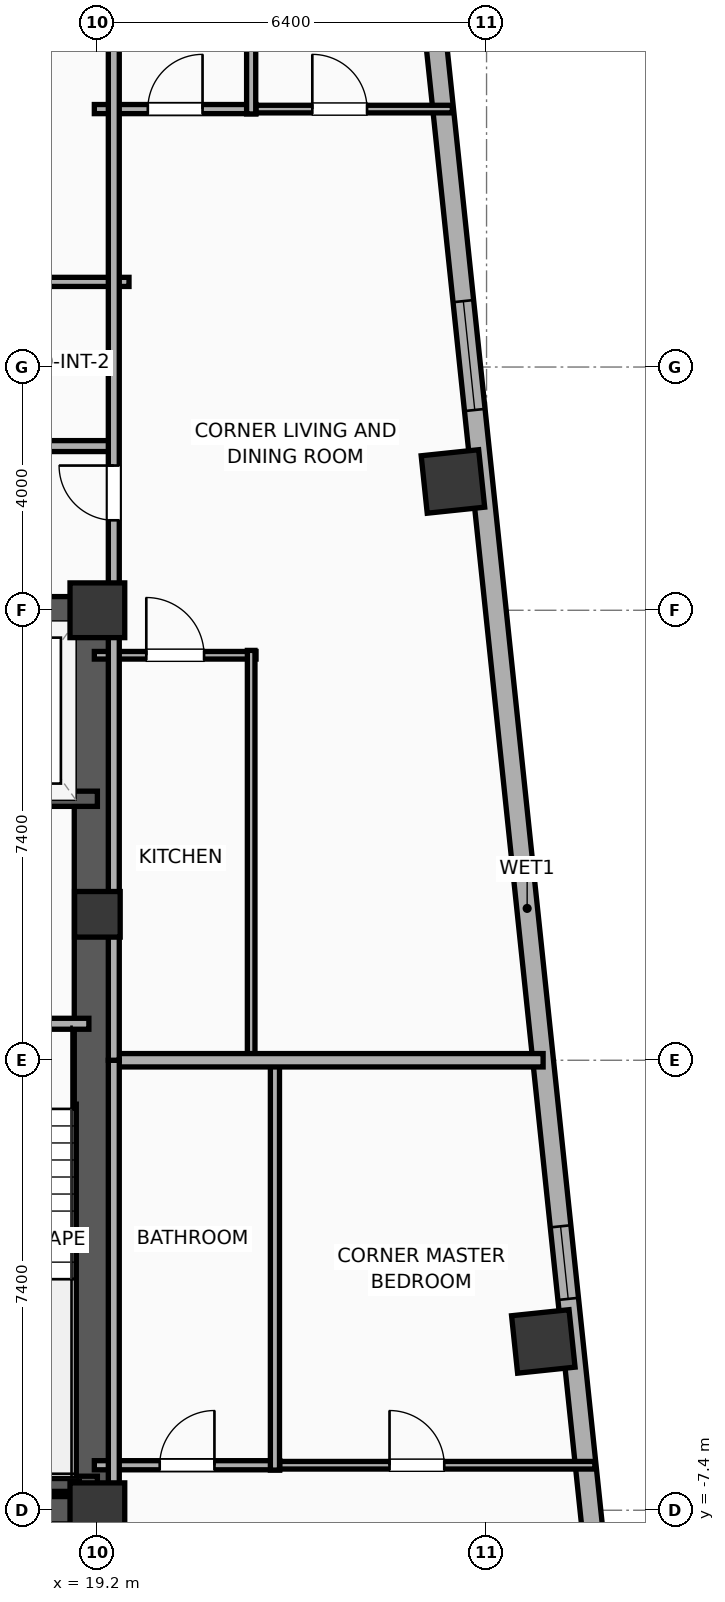
"""IFC4 building model, lengths in metres.
Left out: names, types, materials, properties, quantities, classifications, styles, units other than length and angle.
Written with IfcOpenShell. Run it as: python <this file> out.ifc"""

import sys

from ifc_helpers import new_model, si_unit, direction, frame, frame_2d, origin, origin_2d, place, context, subcontext, project, spatial, rectangle, hollow_rectangle, extrude, element, fill, save


model = new_model("IFC4")
c1 = context("Model", 3, precision=1e-05, world=origin(), true_north=direction((0.0, 1.0)))
c2 = subcontext(c1, "Body", "Model", "MODEL_VIEW")
j1 = project(units=[si_unit("LENGTHUNIT", "METRE"), si_unit("PLANEANGLEUNIT", "RADIAN")], contexts=[c1])
p1 = place(None, origin())
s1 = spatial("IfcSite", under=j1, at=p1, CompositionType="ELEMENT")
p2 = place(p1, origin())
s2 = spatial("IfcBuilding", under=s1, at=p2, CompositionType="ELEMENT")
p3 = place(p2, frame((0.0, 0.0, 179.4)))
s3 = spatial("IfcBuildingStorey", under=s2, at=p3, CompositionType="ELEMENT", Elevation=179.4)
p4 = place(p3, frame((19.2, -7.4, 0.0), z_axis=(0.0, 0.0, 1.0), x_axis=(1.0, 0.0, 0.0)))
e1 = element("IfcColumn", 1, at=p4, inside=s3, PredefinedType="COLUMN", context=c2, shape_type="SweptSolid", body=[
    extrude(rectangle(XDim=0.9, YDim=0.9, at=origin_2d()), origin(), (0.0, 0.0, 1.0), 3.9),
])
p5 = place(p3, frame((19.2, 2.4, 0.0), z_axis=(0.0, 0.0, 1.0), x_axis=(1.0, 0.0, 0.0)))
e2 = element("IfcColumn", 2, at=p5, inside=s3, PredefinedType="COLUMN", context=c2, shape_type="SweptSolid", body=[
    extrude(rectangle(XDim=0.75, YDim=0.75, at=origin_2d()), origin(), (0.0, 0.0, 1.0), 3.9),
])
p6 = place(p3, frame((19.2, 7.4, 0.0), z_axis=(0.0, 0.0, 1.0), x_axis=(1.0, 0.0, 0.0)))
e3 = element("IfcColumn", 3, at=p6, inside=s3, PredefinedType="COLUMN", context=c2, shape_type="SweptSolid", body=[
    extrude(rectangle(XDim=0.9, YDim=0.9, at=origin_2d()), origin(), (0.0, 0.0, 1.0), 3.9),
])
for number, where, z_axis, x_axis in (
    (4, (12.175, -7.4, 0.0), (0.0, 0.0, 1.0), (1.0, 0.0, 0.0)),
    (5, (12.175, 7.4, 0.0), (0.0, 0.0, 1.0), (1.0, 0.0, 0.0)),
):
    element("IfcWall", number, at=place(p3, frame(where, z_axis=z_axis, x_axis=x_axis)), inside=s3, PredefinedType="SHEAR", context=c2, shape_type="SweptSolid", body=[
        extrude(rectangle(XDim=7.25, YDim=0.45, at=frame_2d((3.625, 0.0))), origin(), (0.0, 0.0, 1.0), 3.65),
    ])
p7 = place(p3, frame((19.145, -7.4, 0.0), z_axis=(0.0, 0.0, 1.0), x_axis=(0.0, 1.0, 0.0)))
e6 = element("IfcWall", 6, at=p7, inside=s3, PredefinedType="SHEAR", context=c2, shape_type="SweptSolid", body=[
    extrude(rectangle(XDim=14.8, YDim=0.65, at=frame_2d((7.4, 0.0))), origin(), (0.0, 0.0, 1.0), 3.65),
])
p8 = place(p3, frame((15.74, -6.965, 0.0), z_axis=(0.0, 0.0, 1.0), x_axis=(1.0, 0.0, 0.0)))
e7 = element("IfcWall", 7, at=p8, inside=s3, PredefinedType="SOLIDWALL", context=c2, shape_type="SweptSolid", body=[
    extrude(rectangle(XDim=3.46, YDim=0.25, at=frame_2d((1.73, 0.0))), origin(), (0.0, 0.0, 1.0), 3.65),
])
for number, where, z_axis, x_axis in (
    (8, (26.533, -4.624, 0.0), (0.0, 0.0, 1.0), (0.995, 0.105, 0.0)),
    (9, (25.047, 9.518, 0.0), (0.0, 0.0, 1.0), (0.995, 0.105, 0.0)),
):
    element("IfcColumn", number, at=place(p3, frame(where, z_axis=z_axis, x_axis=x_axis)), inside=s3, PredefinedType="COLUMN", context=c2, shape_type="SweptSolid", body=[
        extrude(hollow_rectangle(XDim=0.95, YDim=0.95, WallThickness=0.032, at=origin_2d()), origin(), (0.0, 0.0, 1.0), 3.9),
    ])
p9 = place(p3, frame((24.534, 18.99, 0.0), z_axis=(0.0, 0.0, 1.0), x_axis=(0.104534959766, -0.994521212537, 0.0)))
e10 = element("IfcWall", 10, at=p9, inside=s3, PredefinedType="ELEMENTEDWALL", context=c2, shape_type="SweptSolid", body=[
    extrude(rectangle(XDim=33.166, YDim=0.34, at=frame_2d((16.583, 0.0))), origin(), (0.0, 0.0, 1.0), 3.65),
])
p10 = place(p9, frame((6.542, 0.0, 0.75)))
e11 = element("IfcOpeningElement", 11, at=p10, cuts=e10, PredefinedType="OPENING", context=c2, shape_type="SweptSolid", body=[
    extrude(rectangle(XDim=1.8, YDim=2.1, at=frame_2d((0.9, 1.05))), frame((0.0, 0.18, 0.0), z_axis=(0.0, -1.0, 0.0), x_axis=(1.0, 0.0, 0.0)), (0.0, 0.0, 1.0), 0.36),
])
p11 = place(p9, frame((21.84, 0.0, 0.75)))
e12 = element("IfcOpeningElement", 12, at=p11, cuts=e10, PredefinedType="OPENING", context=c2, shape_type="SweptSolid", body=[
    extrude(rectangle(XDim=1.2, YDim=2.05, at=frame_2d((0.6, 1.025))), frame((0.0, 0.18, 0.0), z_axis=(0.0, -1.0, 0.0), x_axis=(1.0, 0.0, 0.0)), (0.0, 0.0, 1.0), 0.36),
])
p12 = place(p3, frame((16.6, 4.3, 0.0), z_axis=(0.0, 0.0, 1.0), x_axis=(1.0, 0.0, 0.0)))
e13 = element("IfcWall", 13, at=p12, inside=s3, PredefinedType="SOLIDWALL", context=c2, shape_type="SweptSolid", body=[
    extrude(rectangle(XDim=2.6, YDim=0.25, at=frame_2d((1.3, 0.0))), origin(), (0.0, 0.0, 1.0), 3.65),
])
p13 = place(p3, frame((15.7, 0.6, 0.0), z_axis=(0.0, 0.0, 1.0), x_axis=(1.0, 0.0, 0.0)))
e14 = element("IfcWall", 14, at=p13, inside=s3, PredefinedType="PARTITIONING", context=c2, shape_type="SweptSolid", body=[
    extrude(rectangle(XDim=3.36, YDim=0.18, at=frame_2d((1.68, 0.0))), origin(), (0.0, 0.0, 1.0), 3.65),
])
p14 = place(p13, frame((1.155, 0.0, 0.0)))
e15 = element("IfcOpeningElement", 15, at=p14, cuts=e14, PredefinedType="OPENING", context=c2, shape_type="SweptSolid", body=[
    extrude(rectangle(XDim=1.05, YDim=2.05, at=frame_2d((0.525, 1.025))), frame((0.0, 0.1, 0.0), z_axis=(0.0, -1.0, 0.0), x_axis=(1.0, 0.0, 0.0)), (0.0, 0.0, 1.0), 0.2),
])
p15 = place(p3, frame((17.136, 12.8, 0.0), z_axis=(0.0, 0.0, 1.0), x_axis=(1.0, 0.0, 0.0)))
e16 = element("IfcWall", 16, at=p15, inside=s3, PredefinedType="PLUMBINGWALL", context=c2, shape_type="SweptSolid", body=[
    extrude(rectangle(XDim=2.584, YDim=0.15, at=frame_2d((1.292, 0.0))), origin(), (0.0, 0.0, 1.0), 3.65),
])
p16 = place(p3, frame((8.08, 10.1, 0.0), z_axis=(0.0, 0.0, 1.0), x_axis=(1.0, 0.0, 0.0)))
e17 = element("IfcWall", 17, at=p16, inside=s3, PredefinedType="PARTITIONING", context=c2, shape_type="SweptSolid", body=[
    extrude(rectangle(XDim=11.42, YDim=0.18, at=frame_2d((5.71, 0.0))), origin(), (0.0, 0.0, 1.0), 3.65),
])
p17 = place(p16, frame((2.562, 0.0, 0.0)))
e18 = element("IfcOpeningElement", 18, at=p17, cuts=e17, PredefinedType="OPENING", context=c2, shape_type="SweptSolid", body=[
    extrude(rectangle(XDim=0.9, YDim=2.05, at=frame_2d((0.45, 1.025))), frame((0.0, 0.1, 0.0), z_axis=(0.0, -1.0, 0.0), x_axis=(1.0, 0.0, 0.0)), (0.0, 0.0, 1.0), 0.2),
])
p18 = place(p16, frame((6.853, 0.0, 0.0)))
e19 = element("IfcOpeningElement", 19, at=p18, cuts=e17, PredefinedType="OPENING", context=c2, shape_type="SweptSolid", body=[
    extrude(rectangle(XDim=1.15, YDim=2.05, at=frame_2d((0.575, 1.025))), frame((0.0, 0.1, 0.0), z_axis=(0.0, -1.0, 0.0), x_axis=(1.0, 0.0, 0.0)), (0.0, 0.0, 1.0), 0.2),
])
p19 = place(p3, frame((22.06, -6.66, 0.0), z_axis=(0.0, 0.0, 1.0), x_axis=(1.0, 0.0, 0.0)))
e20 = element("IfcWall", 20, at=p19, inside=s3, PredefinedType="PARTITIONING", context=c2, shape_type="SweptSolid", body=[
    extrude(rectangle(XDim=5.321, YDim=0.125, at=frame_2d((2.661, 0.0))), origin(), (0.0, 0.0, 1.0), 3.65),
])
p20 = place(p19, frame((1.945, 0.0, 0.0)))
e21 = element("IfcOpeningElement", 21, at=p20, cuts=e20, PredefinedType="OPENING", context=c2, shape_type="SweptSolid", body=[
    extrude(rectangle(XDim=0.9, YDim=2.05, at=frame_2d((0.45, 1.025))), frame((0.0, 0.073, 0.0), z_axis=(0.0, -1.0, 0.0), x_axis=(1.0, 0.0, 0.0)), (0.0, 0.0, 1.0), 0.145),
])
p21 = place(p3, frame((19.15, -6.66, 0.0), z_axis=(0.0, 0.0, 1.0), x_axis=(1.0, 0.0, 0.0)))
e22 = element("IfcWall", 22, at=p21, inside=s3, PredefinedType="PLUMBINGWALL", context=c2, shape_type="SweptSolid", body=[
    extrude(rectangle(XDim=3.05, YDim=0.15, at=frame_2d((1.525, 0.0))), origin(), (0.0, 0.0, 1.0), 3.04),
])
p22 = place(p21, frame((1.075, 0.0, 0.0)))
e23 = element("IfcOpeningElement", 23, at=p22, cuts=e22, PredefinedType="OPENING", context=c2, shape_type="SweptSolid", body=[
    extrude(rectangle(XDim=0.9, YDim=2.05, at=frame_2d((0.45, 1.025))), frame((0.0, 0.085, 0.0), z_axis=(0.0, -1.0, 0.0), x_axis=(1.0, 0.0, 0.0)), (0.0, 0.0, 1.0), 0.17),
])
p23 = place(p3, frame((22.12, -6.74, 0.0), z_axis=(0.0, 0.0, 1.0), x_axis=(0.0, 1.0, 0.0)))
e24 = element("IfcWall", 24, at=p23, inside=s3, PredefinedType="PLUMBINGWALL", context=c2, shape_type="SweptSolid", body=[
    extrude(rectangle(XDim=6.72, YDim=0.15, at=frame_2d((3.36, 0.0))), origin(), (0.0, 0.0, 1.0), 3.65),
])
p24 = place(p3, frame((21.669, 15.642, 0.0), z_axis=(0.0, 0.0, 1.0), x_axis=(1.0, 0.0, 0.0)))
e25 = element("IfcWall", 25, at=p24, inside=s3, PredefinedType="PARTITIONING", context=c2, shape_type="SweptSolid", body=[
    extrude(rectangle(XDim=3.368, YDim=0.125, at=frame_2d((1.684, 0.0))), origin(), (0.0, 0.0, 1.0), 3.65),
])
p25 = place(p24, frame((1.066, 0.0, 0.0)))
e26 = element("IfcOpeningElement", 26, at=p25, cuts=e25, PredefinedType="OPENING", context=c2, shape_type="SweptSolid", body=[
    extrude(rectangle(XDim=0.9, YDim=2.05, at=frame_2d((0.45, 1.025))), frame((0.0, 0.073, 0.0), z_axis=(0.0, -1.0, 0.0), x_axis=(1.0, 0.0, 0.0)), (0.0, 0.0, 1.0), 0.145),
])
p26 = place(p3, frame((19.15, 6.66, 0.0), z_axis=(0.0, 0.0, 1.0), x_axis=(1.0, 0.0, 0.0)))
e27 = element("IfcWall", 27, at=p26, inside=s3, PredefinedType="PARTITIONING", context=c2, shape_type="SweptSolid", body=[
    extrude(rectangle(XDim=2.659, YDim=0.125, at=frame_2d((1.33, 0.0))), origin(), (0.0, 0.0, 1.0), 3.65),
])
p27 = place(p26, frame((0.854, 0.0, 0.0)))
e28 = element("IfcOpeningElement", 28, at=p27, cuts=e27, PredefinedType="OPENING", context=c2, shape_type="SweptSolid", body=[
    extrude(rectangle(XDim=0.95, YDim=2.05, at=frame_2d((0.475, 1.025))), frame((0.0, 0.073, 0.0), z_axis=(0.0, -1.0, 0.0), x_axis=(1.0, 0.0, 0.0)), (0.0, 0.0, 1.0), 0.145),
])
p28 = place(p3, frame((19.15, 15.642, 0.0), z_axis=(0.0, 0.0, 1.0), x_axis=(1.0, 0.0, 0.0)))
e29 = element("IfcWall", 29, at=p28, inside=s3, PredefinedType="PLUMBINGWALL", context=c2, shape_type="SweptSolid", body=[
    extrude(rectangle(XDim=2.659, YDim=0.15, at=frame_2d((1.33, 0.0))), origin(), (0.0, 0.0, 1.0), 3.65),
])
p29 = place(p28, frame((0.879, 0.0, 0.0)))
e30 = element("IfcOpeningElement", 30, at=p29, cuts=e29, PredefinedType="OPENING", context=c2, shape_type="SweptSolid", body=[
    extrude(rectangle(XDim=0.9, YDim=2.05, at=frame_2d((0.45, 1.025))), frame((0.0, 0.085, 0.0), z_axis=(0.0, -1.0, 0.0), x_axis=(1.0, 0.0, 0.0)), (0.0, 0.0, 1.0), 0.17),
])
p30 = place(p3, frame((21.729, 0.02, 0.0), z_axis=(0.0, 0.0, 1.0), x_axis=(0.0, 1.0, 0.0)))
e31 = element("IfcWall", 31, at=p30, inside=s3, PredefinedType="PARTITIONING", context=c2, shape_type="SweptSolid", body=[
    extrude(rectangle(XDim=6.72, YDim=0.125, at=frame_2d((3.36, 0.0))), origin(), (0.0, 0.0, 1.0), 3.65),
])
p31 = place(p3, frame((21.729, 15.562, 0.0), z_axis=(0.0, 0.0, 1.0), x_axis=(0.0, 1.0, 0.0)))
e32 = element("IfcWall", 32, at=p31, inside=s3, PredefinedType="PLUMBINGWALL", context=c2, shape_type="SweptSolid", body=[
    extrude(rectangle(XDim=6.713, YDim=0.15, at=frame_2d((3.357, 0.0))), origin(), (0.0, 0.0, 1.0), 3.04),
])
p32 = place(p3, frame((19.47, 0.0, 0.0), z_axis=(0.0, 0.0, 1.0), x_axis=(1.0, 0.0, 0.0)))
e33 = element("IfcWall", 33, at=p32, inside=s3, PredefinedType="PARTITIONING", context=c2, shape_type="SweptSolid", body=[
    extrude(rectangle(XDim=7.06, YDim=0.22, at=frame_2d((3.53, 0.0))), origin(), (0.0, 0.0, 1.0), 3.65),
])
p33 = place(p3, frame((19.47, -18.559, 0.0), z_axis=(0.0, 0.0, 1.0), x_axis=(0.0, 1.0, 0.0)))
e34 = element("IfcWall", 34, at=p33, inside=s3, PredefinedType="PARTITIONING", context=c2, shape_type="SweptSolid", body=[
    extrude(rectangle(XDim=18.559, YDim=0.18, at=frame_2d((9.279, 0.0))), origin(), (0.0, 0.0, 1.0), 3.65),
])
p34 = place(p33, frame((8.779, 0.0, 0.0)))
e35 = element("IfcOpeningElement", 35, at=p34, cuts=e34, PredefinedType="OPENING", context=c2, shape_type="SweptSolid", body=[
    extrude(rectangle(XDim=0.9, YDim=2.05, at=frame_2d((0.45, 1.025))), frame((0.0, 0.1, 0.0), z_axis=(0.0, -1.0, 0.0), x_axis=(1.0, 0.0, 0.0)), (0.0, 0.0, 1.0), 0.2),
])
p35 = place(p3, frame((19.47, 0.0, 0.0), z_axis=(0.0, 0.0, 1.0), x_axis=(0.0, 1.0, 0.0)))
e36 = element("IfcWall", 36, at=p35, inside=s3, PredefinedType="PARTITIONING", context=c2, shape_type="SweptSolid", body=[
    extrude(rectangle(XDim=22.124, YDim=0.18, at=frame_2d((11.062, 0.0))), origin(), (0.0, 0.0, 1.0), 3.04),
])
p36 = place(p35, frame((8.88, 0.0, 0.0)))
e37 = element("IfcOpeningElement", 37, at=p36, cuts=e36, PredefinedType="OPENING", context=c2, shape_type="SweptSolid", body=[
    extrude(rectangle(XDim=0.9, YDim=2.05, at=frame_2d((0.45, 1.025))), frame((0.0, 0.1, 0.0), z_axis=(0.0, -1.0, 0.0), x_axis=(1.0, 0.0, 0.0)), (0.0, 0.0, 1.0), 0.2),
])
p37 = place(p10, origin())
e38 = element("IfcWindow", 38, at=p37, inside=s3, PartitioningType="SINGLE_PANEL", PredefinedType="WINDOW", context=c2, shape_type="SweptSolid", body=[
    extrude(rectangle(XDim=1.8, YDim=2.1, at=frame_2d((0.9, 1.05))), frame((0.0, 0.03, 0.0), z_axis=(0.0, -1.0, 0.0), x_axis=(1.0, 0.0, 0.0)), (0.0, 0.0, 1.0), 0.06),
])
fill(e11, e38)
p38 = place(p11, origin())
e39 = element("IfcWindow", 39, at=p38, inside=s3, PartitioningType="SINGLE_PANEL", PredefinedType="WINDOW", context=c2, shape_type="SweptSolid", body=[
    extrude(rectangle(XDim=1.2, YDim=2.05, at=frame_2d((0.6, 1.025))), frame((0.0, 0.03, 0.0), z_axis=(0.0, -1.0, 0.0), x_axis=(1.0, 0.0, 0.0)), (0.0, 0.0, 1.0), 0.06),
])
fill(e12, e39)
p39 = place(p20, origin())
e40 = element("IfcDoor", 40, at=p39, inside=s3, OperationType="SINGLE_SWING_LEFT", PredefinedType="DOOR", context=c2, shape_type="SweptSolid", body=[
    extrude(rectangle(XDim=0.9, YDim=2.05, at=frame_2d((0.45, 1.025))), frame((0.0, 0.025, 0.0), z_axis=(0.0, -1.0, 0.0), x_axis=(1.0, 0.0, 0.0)), (0.0, 0.0, 1.0), 0.05),
])
fill(e21, e40)
p40 = place(p22, origin())
e41 = element("IfcDoor", 41, at=p40, inside=s3, OperationType="SINGLE_SWING_RIGHT", PredefinedType="DOOR", context=c2, shape_type="SweptSolid", body=[
    extrude(rectangle(XDim=0.9, YDim=2.05, at=frame_2d((0.45, 1.025))), frame((0.0, 0.025, 0.0), z_axis=(0.0, -1.0, 0.0), x_axis=(1.0, 0.0, 0.0)), (0.0, 0.0, 1.0), 0.05),
])
fill(e23, e41)
p41 = place(p25, origin())
e42 = element("IfcDoor", 42, at=p41, inside=s3, OperationType="SINGLE_SWING_LEFT", PredefinedType="DOOR", context=c2, shape_type="SweptSolid", body=[
    extrude(rectangle(XDim=0.9, YDim=2.05, at=frame_2d((0.45, 1.025))), frame((0.0, 0.025, 0.0), z_axis=(0.0, -1.0, 0.0), x_axis=(1.0, 0.0, 0.0)), (0.0, 0.0, 1.0), 0.05),
])
fill(e26, e42)
p42 = place(p27, origin())
e43 = element("IfcDoor", 43, at=p42, inside=s3, OperationType="SINGLE_SWING_LEFT", PredefinedType="DOOR", context=c2, shape_type="SweptSolid", body=[
    extrude(rectangle(XDim=0.95, YDim=2.05, at=frame_2d((0.475, 1.025))), frame((0.0, 0.025, 0.0), z_axis=(0.0, -1.0, 0.0), x_axis=(1.0, 0.0, 0.0)), (0.0, 0.0, 1.0), 0.05),
])
fill(e28, e43)
p43 = place(p29, origin())
e44 = element("IfcDoor", 44, at=p43, inside=s3, OperationType="SINGLE_SWING_RIGHT", PredefinedType="DOOR", context=c2, shape_type="SweptSolid", body=[
    extrude(rectangle(XDim=0.9, YDim=2.05, at=frame_2d((0.45, 1.025))), frame((0.0, 0.025, 0.0), z_axis=(0.0, -1.0, 0.0), x_axis=(1.0, 0.0, 0.0)), (0.0, 0.0, 1.0), 0.05),
])
fill(e30, e44)
p44 = place(p36, origin())
e45 = element("IfcDoor", 45, at=p44, inside=s3, OperationType="SINGLE_SWING_RIGHT", PredefinedType="DOOR", context=c2, shape_type="SweptSolid", body=[
    extrude(rectangle(XDim=0.9, YDim=2.05, at=frame_2d((0.45, 1.025))), frame((0.0, 0.025, 0.0), z_axis=(0.0, -1.0, 0.0), x_axis=(1.0, 0.0, 0.0)), (0.0, 0.0, 1.0), 0.05),
])
fill(e37, e45)
save(model, sys.argv[1])
